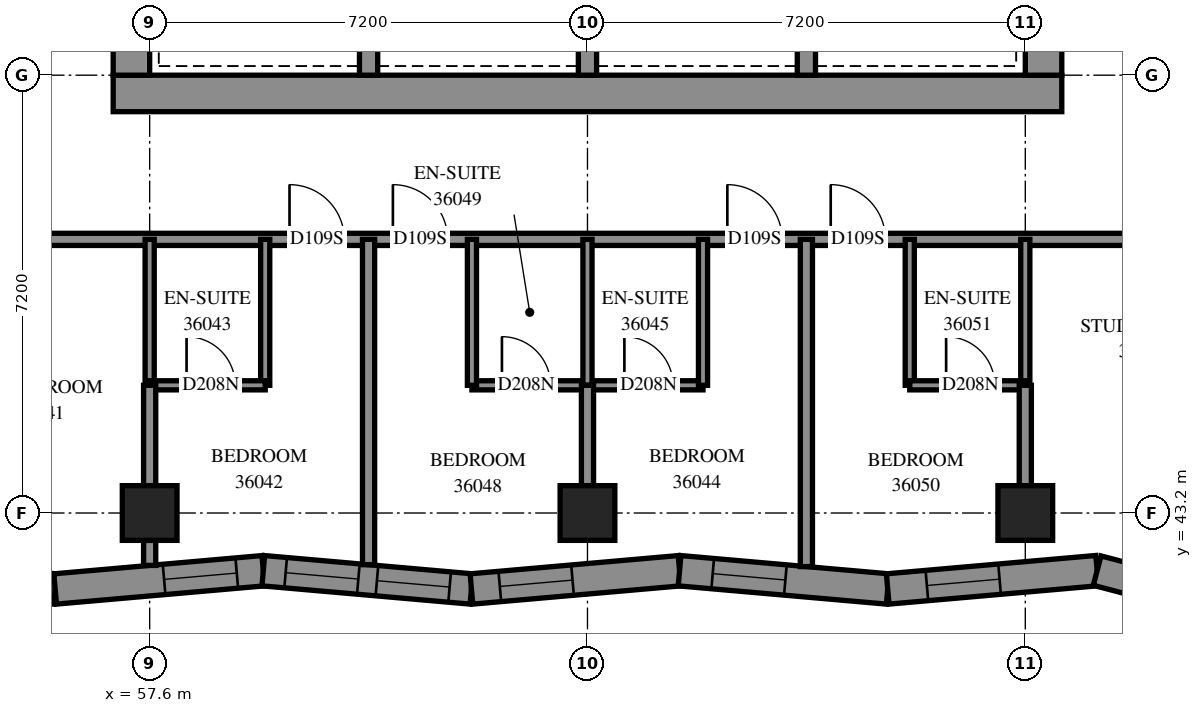
"""IFC4 building model, lengths in metres.
Left out: names, types, materials, properties, quantities, classifications, styles, units other than length and angle.
Written with IfcOpenShell. Run it as: python <this file> out.ifc"""

import sys

from ifc_helpers import new_model, si_unit, direction, frame, frame_2d, origin, origin_2d, place, context, subcontext, project, spatial, polyline, rectangle, outline, extrude, element, fill, save


model = new_model("IFC4")
c1 = context("Model", 3, precision=1e-05, world=origin(), true_north=direction((0.0, 1.0)))
c2 = subcontext(c1, "Body", "Model", "MODEL_VIEW")
j1 = project(units=[si_unit("LENGTHUNIT", "METRE"), si_unit("PLANEANGLEUNIT", "RADIAN")], contexts=[c1])
p1 = place(None, origin())
s1 = spatial("IfcSite", under=j1, at=p1, CompositionType="ELEMENT")
p2 = place(p1, origin())
s2 = spatial("IfcBuilding", under=s1, at=p2, CompositionType="ELEMENT")
p3 = place(p2, frame((0.0, 0.0, 135.4)))
s3 = spatial("IfcBuildingStorey", under=s2, at=p3, CompositionType="ELEMENT", Elevation=135.4)
for number, where, z_axis, x_axis in (
    (1, (57.6, 43.2, 0.0), (0.0, 0.0, 1.0), (1.0, 0.0, 0.0)),
    (2, (64.8, 43.2, 0.0), (0.0, 0.0, 1.0), (1.0, 0.0, 0.0)),
    (3, (72.0, 43.2, 0.0), (0.0, 0.0, 1.0), (1.0, 0.0, 0.0)),
):
    element("IfcColumn", number, at=place(p3, frame(where, z_axis=z_axis, x_axis=x_axis)), inside=s3, PredefinedType="COLUMN", context=c2, shape_type="SweptSolid", body=[
        extrude(rectangle(XDim=0.9, YDim=0.9, at=origin_2d()), origin(), (0.0, 0.0, 1.0), 3.1),
    ])
p4 = place(p3, frame((57.0, 50.1, -0.3), z_axis=(0.0, 0.0, 1.0), x_axis=(1.0, 0.0, 0.0)))
e4 = element("IfcWall", 4, at=p4, inside=s3, PredefinedType="SHEAR", context=c2, shape_type="SweptSolid", body=[
    extrude(rectangle(XDim=15.6, YDim=0.6, at=frame_2d((7.8, 0.0))), origin(), (0.0, 0.0, 1.0), 2.7),
])
p5 = place(p3, frame((57.3, 50.4, -0.3), z_axis=(0.0, 0.0, 1.0), x_axis=(0.0, 1.0, 0.0)))
e5 = element("IfcWall", 5, at=p5, inside=s3, PredefinedType="SHEAR", context=c2, shape_type="SweptSolid", body=[
    extrude(rectangle(XDim=14.4, YDim=0.6, at=frame_2d((7.2, 0.0))), origin(), (0.0, 0.0, 1.0), 2.7),
])
p6 = place(p5, frame((4.55, 0.0, 0.3)))
e6 = element("IfcOpeningElement", 6, at=p6, cuts=e5, PredefinedType="OPENING", context=c2, shape_type="SweptSolid", body=[
    extrude(rectangle(XDim=1.1, YDim=2.1, at=frame_2d((0.55, 1.05))), frame((0.0, 0.31, 0.0), z_axis=(0.0, -1.0, 0.0), x_axis=(1.0, 0.0, 0.0)), (0.0, 0.0, 1.0), 0.62),
])
p7 = place(p5, frame((11.35, 0.0, 0.3)))
e7 = element("IfcOpeningElement", 7, at=p7, cuts=e5, PredefinedType="OPENING", context=c2, shape_type="SweptSolid", body=[
    extrude(rectangle(XDim=1.1, YDim=2.1, at=frame_2d((0.55, 1.05))), frame((0.0, 0.31, 0.0), z_axis=(0.0, -1.0, 0.0), x_axis=(1.0, 0.0, 0.0)), (0.0, 0.0, 1.0), 0.62),
])
p8 = place(p3, frame((72.3, 50.4, -0.3), z_axis=(0.0, 0.0, 1.0), x_axis=(0.0, 1.0, 0.0)))
e8 = element("IfcWall", 8, at=p8, inside=s3, PredefinedType="SHEAR", context=c2, shape_type="SweptSolid", body=[
    extrude(rectangle(XDim=14.4, YDim=0.6, at=frame_2d((7.2, 0.0))), origin(), (0.0, 0.0, 1.0), 2.7),
])
p9 = place(p8, frame((4.55, 0.0, 0.3)))
e9 = element("IfcOpeningElement", 9, at=p9, cuts=e8, PredefinedType="OPENING", context=c2, shape_type="SweptSolid", body=[
    extrude(rectangle(XDim=1.1, YDim=2.1, at=frame_2d((0.55, 1.05))), frame((0.0, 0.31, 0.0), z_axis=(0.0, -1.0, 0.0), x_axis=(1.0, 0.0, 0.0)), (0.0, 0.0, 1.0), 0.62),
])
p10 = place(p8, frame((11.35, 0.0, 0.3)))
e10 = element("IfcOpeningElement", 10, at=p10, cuts=e8, PredefinedType="OPENING", context=c2, shape_type="SweptSolid", body=[
    extrude(rectangle(XDim=1.1, YDim=2.1, at=frame_2d((0.55, 1.05))), frame((0.0, 0.31, 0.0), z_axis=(0.0, -1.0, 0.0), x_axis=(1.0, 0.0, 0.0)), (0.0, 0.0, 1.0), 0.62),
])
for number, where, z_axis, x_axis in (
    (11, (61.2, 50.4, 0.0), (0.0, 0.0, 1.0), (0.0, 1.0, 0.0)),
    (12, (64.8, 50.4, 0.0), (0.0, 0.0, 1.0), (0.0, 1.0, 0.0)),
    (13, (68.4, 50.4, 0.0), (0.0, 0.0, 1.0), (0.0, 1.0, 0.0)),
):
    element("IfcWall", number, at=place(p3, frame(where, z_axis=z_axis, x_axis=x_axis)), inside=s3, PredefinedType="SOLIDWALL", context=c2, shape_type="SweptSolid", body=[
        extrude(rectangle(XDim=3.3, YDim=0.3, at=frame_2d((1.65, 0.0))), origin(), (0.0, 0.0, 1.0), 3.1),
    ])
p11 = place(p3, frame((52.601, 42.253, 0.0), z_axis=(0.0, 0.0, 1.0), x_axis=(0.9961832879, -0.0872860633, 0.0)))
e14 = element("IfcWall", 14, at=p11, inside=s3, PredefinedType="SOLIDWALL", context=c2, shape_type="SweptSolid", body=[
    extrude(outline(polyline([(0.043, -0.25), (3.479, -0.25), (3.436, 0.25), (-0.043, 0.25), (0.043, -0.25)])), origin(), (0.0, 0.0, 1.0), 3.1),
])
p12 = place(p11, frame((1.72, 0.0, 0.45)))
e15 = element("IfcOpeningElement", 15, at=p12, cuts=e14, PredefinedType="OPENING", context=c2, shape_type="SweptSolid", body=[
    extrude(rectangle(XDim=1.2, YDim=2.5, at=frame_2d((0.6, 1.25))), frame((0.0, 0.26, 0.0), z_axis=(0.0, -1.0, 0.0), x_axis=(1.0, 0.0, 0.0)), (0.0, 0.0, 1.0), 0.52),
])
p13 = place(p3, frame((56.046, 41.951, 0.0), z_axis=(0.0, 0.0, 1.0), x_axis=(0.996181166, 0.0873102778, 0.0)))
e16 = element("IfcWall", 16, at=p13, inside=s3, PredefinedType="SOLIDWALL", context=c2, shape_type="SweptSolid", body=[
    extrude(outline(polyline([(-0.022, -0.25), (3.414, -0.25), (3.458, 0.25), (0.022, 0.25), (-0.022, -0.25)])), origin(), (0.0, 0.0, 1.0), 3.1),
])
p14 = place(p13, frame((1.798, 0.0, 0.45)))
e17 = element("IfcOpeningElement", 17, at=p14, cuts=e16, PredefinedType="OPENING", context=c2, shape_type="SweptSolid", body=[
    extrude(rectangle(XDim=1.2, YDim=2.5, at=frame_2d((0.6, 1.25))), frame((0.0, 0.26, 0.0), z_axis=(0.0, -1.0, 0.0), x_axis=(1.0, 0.0, 0.0)), (0.0, 0.0, 1.0), 0.52),
])
p15 = place(p3, frame((59.469, 42.251, 0.0), z_axis=(0.0, 0.0, 1.0), x_axis=(0.996181166, -0.0873102778, 0.0)))
e18 = element("IfcWall", 18, at=p15, inside=s3, PredefinedType="SOLIDWALL", context=c2, shape_type="SweptSolid", body=[
    extrude(outline(polyline([(0.022, -0.25), (3.458, -0.25), (3.414, 0.25), (-0.022, 0.25), (0.022, -0.25)])), origin(), (0.0, 0.0, 1.0), 3.1),
])
p16 = place(p15, frame((0.369, 0.0, 0.45)))
e19 = element("IfcOpeningElement", 19, at=p16, cuts=e18, PredefinedType="OPENING", context=c2, shape_type="SweptSolid", body=[
    extrude(rectangle(XDim=1.2, YDim=2.5, at=frame_2d((0.6, 1.25))), frame((0.0, 0.26, 0.0), z_axis=(0.0, -1.0, 0.0), x_axis=(1.0, 0.0, 0.0)), (0.0, 0.0, 1.0), 0.52),
])
p17 = place(p15, frame((1.876, 0.0, 0.45)))
e20 = element("IfcOpeningElement", 20, at=p17, cuts=e18, PredefinedType="OPENING", context=c2, shape_type="SweptSolid", body=[
    extrude(rectangle(XDim=1.2, YDim=2.5, at=frame_2d((0.6, 1.25))), frame((0.0, 0.26, 0.0), z_axis=(0.0, -1.0, 0.0), x_axis=(1.0, 0.0, 0.0)), (0.0, 0.0, 1.0), 0.52),
])
p18 = place(p3, frame((62.892, 41.951, 0.0), z_axis=(0.0, 0.0, 1.0), x_axis=(0.9961809441, 0.0873128092, 0.0)))
e21 = element("IfcWall", 21, at=p18, inside=s3, PredefinedType="SOLIDWALL", context=c2, shape_type="SweptSolid", body=[
    extrude(outline(polyline([(-0.022, -0.25), (3.414, -0.25), (3.458, 0.25), (0.022, 0.25), (-0.022, -0.25)])), origin(), (0.0, 0.0, 1.0), 3.1),
])
p19 = place(p18, frame((0.469, 0.0, 0.45)))
e22 = element("IfcOpeningElement", 22, at=p19, cuts=e21, PredefinedType="OPENING", context=c2, shape_type="SweptSolid", body=[
    extrude(rectangle(XDim=1.2, YDim=2.5, at=frame_2d((0.6, 1.25))), frame((0.0, 0.26, 0.0), z_axis=(0.0, -1.0, 0.0), x_axis=(1.0, 0.0, 0.0)), (0.0, 0.0, 1.0), 0.52),
])
p20 = place(p3, frame((66.314, 42.251, 0.0), z_axis=(0.0, 0.0, 1.0), x_axis=(0.996181166, -0.0873102778, 0.0)))
e23 = element("IfcWall", 23, at=p20, inside=s3, PredefinedType="SOLIDWALL", context=c2, shape_type="SweptSolid", body=[
    extrude(outline(polyline([(0.022, -0.25), (3.458, -0.25), (3.414, 0.25), (-0.022, 0.25), (0.022, -0.25)])), origin(), (0.0, 0.0, 1.0), 3.1),
])
p21 = place(p20, frame((0.547, 0.0, 0.45)))
e24 = element("IfcOpeningElement", 24, at=p21, cuts=e23, PredefinedType="OPENING", context=c2, shape_type="SweptSolid", body=[
    extrude(rectangle(XDim=1.2, YDim=2.5, at=frame_2d((0.6, 1.25))), frame((0.0, 0.26, 0.0), z_axis=(0.0, -1.0, 0.0), x_axis=(1.0, 0.0, 0.0)), (0.0, 0.0, 1.0), 0.52),
])
p22 = place(p3, frame((69.737, 41.951, 0.0), z_axis=(0.0, 0.0, 1.0), x_axis=(0.9961832879, 0.0872860633, 0.0)))
e25 = element("IfcWall", 25, at=p22, inside=s3, PredefinedType="SOLIDWALL", context=c2, shape_type="SweptSolid", body=[
    extrude(outline(polyline([(-0.022, -0.25), (3.414, -0.25), (3.501, 0.25), (0.022, 0.25), (-0.022, -0.25)])), origin(), (0.0, 0.0, 1.0), 3.1),
])
p23 = place(p22, frame((0.647, 0.0, 0.45)))
e26 = element("IfcOpeningElement", 26, at=p23, cuts=e25, PredefinedType="OPENING", context=c2, shape_type="SweptSolid", body=[
    extrude(rectangle(XDim=1.2, YDim=2.5, at=frame_2d((0.6, 1.25))), frame((0.0, 0.26, 0.0), z_axis=(0.0, -1.0, 0.0), x_axis=(1.0, 0.0, 0.0)), (0.0, 0.0, 1.0), 0.52),
])
p24 = place(p3, frame((73.182, 42.253, 0.0), z_axis=(0.0, 0.0, 1.0), x_axis=(0.9671281624, -0.2542894363, 0.0)))
e27 = element("IfcWall", 27, at=p24, inside=s3, PredefinedType="SOLIDWALL", context=c2, shape_type="SweptSolid", body=[
    extrude(outline(polyline([(0.043, -0.25), (3.583, -0.25), (3.661, 0.25), (-0.043, 0.25), (0.043, -0.25)])), origin(), (0.0, 0.0, 1.0), 3.1),
])
p25 = place(p24, frame((0.65, 0.0, 0.45)))
e28 = element("IfcOpeningElement", 28, at=p25, cuts=e27, PredefinedType="OPENING", context=c2, shape_type="SweptSolid", body=[
    extrude(rectangle(XDim=1.2, YDim=2.5, at=frame_2d((0.6, 1.25))), frame((0.0, 0.26, 0.0), z_axis=(0.0, -1.0, 0.0), x_axis=(1.0, 0.0, 0.0)), (0.0, 0.0, 1.0), 0.52),
])
p26 = place(p3, frame((54.9, 47.7, 0.0), z_axis=(0.0, 0.0, 1.0), x_axis=(1.0, 0.0, 0.0)))
e29 = element("IfcWall", 29, at=p26, inside=s3, PredefinedType="PARTITIONING", context=c2, shape_type="SweptSolid", body=[
    extrude(rectangle(XDim=19.326, YDim=0.2, at=frame_2d((9.663, 0.0))), origin(), (0.0, 0.0, 1.0), 3.1),
])
p27 = place(p26, frame((5.0, 0.0, 0.0)))
e30 = element("IfcOpeningElement", 30, at=p27, cuts=e29, PredefinedType="OPENING", context=c2, shape_type="SweptSolid", body=[
    extrude(rectangle(XDim=0.9, YDim=2.1, at=frame_2d((0.45, 1.05))), frame((0.0, 0.11, 0.0), z_axis=(0.0, -1.0, 0.0), x_axis=(1.0, 0.0, 0.0)), (0.0, 0.0, 1.0), 0.22),
])
p28 = place(p26, frame((12.2, 0.0, 0.0)))
e31 = element("IfcOpeningElement", 31, at=p28, cuts=e29, PredefinedType="OPENING", context=c2, shape_type="SweptSolid", body=[
    extrude(rectangle(XDim=0.9, YDim=2.1, at=frame_2d((0.45, 1.05))), frame((0.0, 0.11, 0.0), z_axis=(0.0, -1.0, 0.0), x_axis=(1.0, 0.0, 0.0)), (0.0, 0.0, 1.0), 0.22),
])
p29 = place(p26, frame((6.7, 0.0, 0.0)))
e32 = element("IfcOpeningElement", 32, at=p29, cuts=e29, PredefinedType="OPENING", context=c2, shape_type="SweptSolid", body=[
    extrude(rectangle(XDim=0.9, YDim=2.1, at=frame_2d((0.45, 1.05))), frame((0.0, 0.11, 0.0), z_axis=(0.0, -1.0, 0.0), x_axis=(1.0, 0.0, 0.0)), (0.0, 0.0, 1.0), 0.22),
])
p30 = place(p26, frame((13.9, 0.0, 0.0)))
e33 = element("IfcOpeningElement", 33, at=p30, cuts=e29, PredefinedType="OPENING", context=c2, shape_type="SweptSolid", body=[
    extrude(rectangle(XDim=0.9, YDim=2.1, at=frame_2d((0.45, 1.05))), frame((0.0, 0.11, 0.0), z_axis=(0.0, -1.0, 0.0), x_axis=(1.0, 0.0, 0.0)), (0.0, 0.0, 1.0), 0.22),
])
p31 = place(p3, frame((68.4, 42.319, 0.0), z_axis=(0.0, 0.0, 1.0), x_axis=(0.0, 1.0, 0.0)))
e34 = element("IfcWall", 34, at=p31, inside=s3, PredefinedType="PARTITIONING", context=c2, shape_type="SweptSolid", body=[
    extrude(rectangle(XDim=5.381, YDim=0.2, at=frame_2d((2.69, 0.0))), origin(), (0.0, 0.0, 1.0), 3.1),
])
p32 = place(p3, frame((61.2, 42.35, 0.0), z_axis=(0.0, 0.0, 1.0), x_axis=(0.0, 1.0, 0.0)))
e35 = element("IfcWall", 35, at=p32, inside=s3, PredefinedType="PARTITIONING", context=c2, shape_type="SweptSolid", body=[
    extrude(rectangle(XDim=5.35, YDim=0.2, at=frame_2d((2.675, 0.0))), origin(), (0.0, 0.0, 1.0), 3.1),
])
p33 = place(p3, frame((62.9, 45.3, 0.0), z_axis=(0.0, 0.0, 1.0), x_axis=(1.0, 0.0, 0.0)))
e36 = element("IfcWall", 36, at=p33, inside=s3, PredefinedType="PARTITIONING", context=c2, shape_type="SweptSolid", body=[
    extrude(rectangle(XDim=3.8, YDim=0.15, at=frame_2d((1.9, 0.0))), origin(), (0.0, 0.0, 1.0), 3.1),
])
p34 = place(p33, frame((2.507, 0.0, 0.0)))
e37 = element("IfcOpeningElement", 37, at=p34, cuts=e36, PredefinedType="OPENING", context=c2, shape_type="SweptSolid", body=[
    extrude(rectangle(XDim=0.8, YDim=2.1, at=frame_2d((0.4, 1.05))), frame((0.0, 0.085, 0.0), z_axis=(0.0, -1.0, 0.0), x_axis=(1.0, 0.0, 0.0)), (0.0, 0.0, 1.0), 0.17),
])
p35 = place(p33, frame((0.493, 0.0, 0.0)))
e38 = element("IfcOpeningElement", 38, at=p35, cuts=e36, PredefinedType="OPENING", context=c2, shape_type="SweptSolid", body=[
    extrude(rectangle(XDim=0.8, YDim=2.1, at=frame_2d((0.4, 1.05))), frame((0.0, 0.085, 0.0), z_axis=(0.0, -1.0, 0.0), x_axis=(1.0, 0.0, 0.0)), (0.0, 0.0, 1.0), 0.17),
])
for number, where, z_axis, x_axis in (
    (39, (59.5, 45.3, 0.0), (0.0, 0.0, 1.0), (0.0, 1.0, 0.0)),
    (40, (57.6, 45.3, 0.0), (0.0, 0.0, 1.0), (0.0, 1.0, 0.0)),
    (41, (62.9, 45.3, 0.0), (0.0, 0.0, 1.0), (0.0, 1.0, 0.0)),
    (42, (66.7, 45.3, 0.0), (0.0, 0.0, 1.0), (0.0, 1.0, 0.0)),
    (43, (64.8, 45.3, 0.0), (0.0, 0.0, 1.0), (0.0, 1.0, 0.0)),
    (44, (70.1, 45.3, 0.0), (0.0, 0.0, 1.0), (0.0, 1.0, 0.0)),
    (45, (72.0, 45.3, 0.0), (0.0, 0.0, 1.0), (0.0, 1.0, 0.0)),
):
    element("IfcWall", number, at=place(p3, frame(where, z_axis=z_axis, x_axis=x_axis)), inside=s3, PredefinedType="PARTITIONING", context=c2, shape_type="SweptSolid", body=[
        extrude(rectangle(XDim=2.4, YDim=0.15, at=frame_2d((1.2, 0.0))), origin(), (0.0, 0.0, 1.0), 3.1),
    ])
p36 = place(p3, frame((70.1, 45.3, 0.0), z_axis=(0.0, 0.0, 1.0), x_axis=(1.0, 0.0, 0.0)))
e46 = element("IfcWall", 46, at=p36, inside=s3, PredefinedType="PARTITIONING", context=c2, shape_type="SweptSolid", body=[
    extrude(rectangle(XDim=1.9, YDim=0.15, at=frame_2d((0.95, 0.0))), origin(), (0.0, 0.0, 1.0), 3.1),
])
p37 = place(p36, frame((0.598, 0.0, 0.0)))
e47 = element("IfcOpeningElement", 47, at=p37, cuts=e46, PredefinedType="OPENING", context=c2, shape_type="SweptSolid", body=[
    extrude(rectangle(XDim=0.8, YDim=2.1, at=frame_2d((0.4, 1.05))), frame((0.0, 0.085, 0.0), z_axis=(0.0, -1.0, 0.0), x_axis=(1.0, 0.0, 0.0)), (0.0, 0.0, 1.0), 0.17),
])
p38 = place(p3, frame((57.6, 45.3, 0.0), z_axis=(0.0, 0.0, 1.0), x_axis=(1.0, 0.0, 0.0)))
e48 = element("IfcWall", 48, at=p38, inside=s3, PredefinedType="PARTITIONING", context=c2, shape_type="SweptSolid", body=[
    extrude(rectangle(XDim=1.9, YDim=0.15, at=frame_2d((0.95, 0.0))), origin(), (0.0, 0.0, 1.0), 3.1),
])
p39 = place(p38, frame((0.607, 0.0, 0.0)))
e49 = element("IfcOpeningElement", 49, at=p39, cuts=e48, PredefinedType="OPENING", context=c2, shape_type="SweptSolid", body=[
    extrude(rectangle(XDim=0.8, YDim=2.1, at=frame_2d((0.4, 1.05))), frame((0.0, 0.085, 0.0), z_axis=(0.0, -1.0, 0.0), x_axis=(1.0, 0.0, 0.0)), (0.0, 0.0, 1.0), 0.17),
])
for number, where, z_axis, x_axis in (
    (50, (57.6, 43.65, 0.0), (0.0, 0.0, 1.0), (0.0, 1.0, 0.0)),
    (51, (64.8, 43.65, 0.0), (0.0, 0.0, 1.0), (0.0, 1.0, 0.0)),
    (52, (72.0, 43.65, 0.0), (0.0, 0.0, 1.0), (0.0, 1.0, 0.0)),
):
    element("IfcWall", number, at=place(p3, frame(where, z_axis=z_axis, x_axis=x_axis)), inside=s3, PredefinedType="PARTITIONING", context=c2, shape_type="SweptSolid", body=[
        extrude(rectangle(XDim=1.65, YDim=0.2, at=frame_2d((0.825, 0.0))), origin(), (0.0, 0.0, 1.0), 3.1),
    ])
p40 = place(p3, frame((57.6, 42.338, 0.0), z_axis=(0.0, 0.0, 1.0), x_axis=(0.0, 1.0, 0.0)))
e53 = element("IfcWall", 53, at=p40, inside=s3, PredefinedType="PARTITIONING", context=c2, shape_type="SweptSolid", body=[
    extrude(rectangle(XDim=0.412, YDim=0.2, at=frame_2d((0.206, 0.0))), origin(), (0.0, 0.0, 1.0), 3.1),
])
p41 = place(p14, origin())
e54 = element("IfcWindow", 54, at=p41, inside=s3, PartitioningType="SINGLE_PANEL", PredefinedType="WINDOW", context=c2, shape_type="SweptSolid", body=[
    extrude(rectangle(XDim=1.2, YDim=2.5, at=frame_2d((0.6, 1.25))), frame((0.0, 0.18, 0.0), z_axis=(0.0, -1.0, 0.0), x_axis=(1.0, 0.0, 0.0)), (0.0, 0.0, 1.0), 0.06),
])
fill(e17, e54)
p42 = place(p16, origin())
e55 = element("IfcWindow", 55, at=p42, inside=s3, PartitioningType="SINGLE_PANEL", PredefinedType="WINDOW", context=c2, shape_type="SweptSolid", body=[
    extrude(rectangle(XDim=1.2, YDim=2.5, at=frame_2d((0.6, 1.25))), frame((0.0, 0.18, 0.0), z_axis=(0.0, -1.0, 0.0), x_axis=(1.0, 0.0, 0.0)), (0.0, 0.0, 1.0), 0.06),
])
fill(e19, e55)
p43 = place(p17, origin())
e56 = element("IfcWindow", 56, at=p43, inside=s3, PartitioningType="SINGLE_PANEL", PredefinedType="WINDOW", context=c2, shape_type="SweptSolid", body=[
    extrude(rectangle(XDim=1.2, YDim=2.5, at=frame_2d((0.6, 1.25))), frame((0.0, 0.18, 0.0), z_axis=(0.0, -1.0, 0.0), x_axis=(1.0, 0.0, 0.0)), (0.0, 0.0, 1.0), 0.06),
])
fill(e20, e56)
p44 = place(p19, origin())
e57 = element("IfcWindow", 57, at=p44, inside=s3, PartitioningType="SINGLE_PANEL", PredefinedType="WINDOW", context=c2, shape_type="SweptSolid", body=[
    extrude(rectangle(XDim=1.2, YDim=2.5, at=frame_2d((0.6, 1.25))), frame((0.0, 0.18, 0.0), z_axis=(0.0, -1.0, 0.0), x_axis=(1.0, 0.0, 0.0)), (0.0, 0.0, 1.0), 0.06),
])
fill(e22, e57)
p45 = place(p21, origin())
e58 = element("IfcWindow", 58, at=p45, inside=s3, PartitioningType="SINGLE_PANEL", PredefinedType="WINDOW", context=c2, shape_type="SweptSolid", body=[
    extrude(rectangle(XDim=1.2, YDim=2.5, at=frame_2d((0.6, 1.25))), frame((0.0, 0.18, 0.0), z_axis=(0.0, -1.0, 0.0), x_axis=(1.0, 0.0, 0.0)), (0.0, 0.0, 1.0), 0.06),
])
fill(e24, e58)
p46 = place(p23, origin())
e59 = element("IfcWindow", 59, at=p46, inside=s3, PartitioningType="SINGLE_PANEL", PredefinedType="WINDOW", context=c2, shape_type="SweptSolid", body=[
    extrude(rectangle(XDim=1.2, YDim=2.5, at=frame_2d((0.6, 1.25))), frame((0.0, 0.18, 0.0), z_axis=(0.0, -1.0, 0.0), x_axis=(1.0, 0.0, 0.0)), (0.0, 0.0, 1.0), 0.06),
])
fill(e26, e59)
p47 = place(p27, origin())
e60 = element("IfcDoor", 60, at=p47, inside=s3, OperationType="SINGLE_SWING_LEFT", PredefinedType="DOOR", context=c2, shape_type="SweptSolid", body=[
    extrude(rectangle(XDim=0.9, YDim=2.1, at=frame_2d((0.45, 1.05))), frame((0.0, 0.025, 0.0), z_axis=(0.0, -1.0, 0.0), x_axis=(1.0, 0.0, 0.0)), (0.0, 0.0, 1.0), 0.05),
])
fill(e30, e60)
p48 = place(p39, origin())
e61 = element("IfcDoor", 61, at=p48, inside=s3, OperationType="SINGLE_SWING_RIGHT", PredefinedType="DOOR", context=c2, shape_type="SweptSolid", body=[
    extrude(rectangle(XDim=0.8, YDim=2.1, at=frame_2d((0.4, 1.05))), frame((0.0, 0.025, 0.0), z_axis=(0.0, -1.0, 0.0), x_axis=(1.0, 0.0, 0.0)), (0.0, 0.0, 1.0), 0.05),
])
fill(e49, e61)
p49 = place(p28, origin())
e62 = element("IfcDoor", 62, at=p49, inside=s3, OperationType="SINGLE_SWING_LEFT", PredefinedType="DOOR", context=c2, shape_type="SweptSolid", body=[
    extrude(rectangle(XDim=0.9, YDim=2.1, at=frame_2d((0.45, 1.05))), frame((0.0, 0.025, 0.0), z_axis=(0.0, -1.0, 0.0), x_axis=(1.0, 0.0, 0.0)), (0.0, 0.0, 1.0), 0.05),
])
fill(e31, e62)
p50 = place(p34, origin())
e63 = element("IfcDoor", 63, at=p50, inside=s3, OperationType="SINGLE_SWING_RIGHT", PredefinedType="DOOR", context=c2, shape_type="SweptSolid", body=[
    extrude(rectangle(XDim=0.8, YDim=2.1, at=frame_2d((0.4, 1.05))), frame((0.0, 0.025, 0.0), z_axis=(0.0, -1.0, 0.0), x_axis=(1.0, 0.0, 0.0)), (0.0, 0.0, 1.0), 0.05),
])
fill(e37, e63)
p51 = place(p29, origin())
e64 = element("IfcDoor", 64, at=p51, inside=s3, OperationType="SINGLE_SWING_RIGHT", PredefinedType="DOOR", context=c2, shape_type="SweptSolid", body=[
    extrude(rectangle(XDim=0.9, YDim=2.1, at=frame_2d((0.45, 1.05))), frame((0.0, 0.025, 0.0), z_axis=(0.0, -1.0, 0.0), x_axis=(1.0, 0.0, 0.0)), (0.0, 0.0, 1.0), 0.05),
])
fill(e32, e64)
p52 = place(p35, origin())
e65 = element("IfcDoor", 65, at=p52, inside=s3, OperationType="SINGLE_SWING_RIGHT", PredefinedType="DOOR", context=c2, shape_type="SweptSolid", body=[
    extrude(rectangle(XDim=0.8, YDim=2.1, at=frame_2d((0.4, 1.05))), frame((0.0, 0.025, 0.0), z_axis=(0.0, -1.0, 0.0), x_axis=(1.0, 0.0, 0.0)), (0.0, 0.0, 1.0), 0.05),
])
fill(e38, e65)
p53 = place(p30, origin())
e66 = element("IfcDoor", 66, at=p53, inside=s3, OperationType="SINGLE_SWING_RIGHT", PredefinedType="DOOR", context=c2, shape_type="SweptSolid", body=[
    extrude(rectangle(XDim=0.9, YDim=2.1, at=frame_2d((0.45, 1.05))), frame((0.0, 0.025, 0.0), z_axis=(0.0, -1.0, 0.0), x_axis=(1.0, 0.0, 0.0)), (0.0, 0.0, 1.0), 0.05),
])
fill(e33, e66)
p54 = place(p37, origin())
e67 = element("IfcDoor", 67, at=p54, inside=s3, OperationType="SINGLE_SWING_RIGHT", PredefinedType="DOOR", context=c2, shape_type="SweptSolid", body=[
    extrude(rectangle(XDim=0.8, YDim=2.1, at=frame_2d((0.4, 1.05))), frame((0.0, 0.025, 0.0), z_axis=(0.0, -1.0, 0.0), x_axis=(1.0, 0.0, 0.0)), (0.0, 0.0, 1.0), 0.05),
])
fill(e47, e67)
save(model, sys.argv[1])
